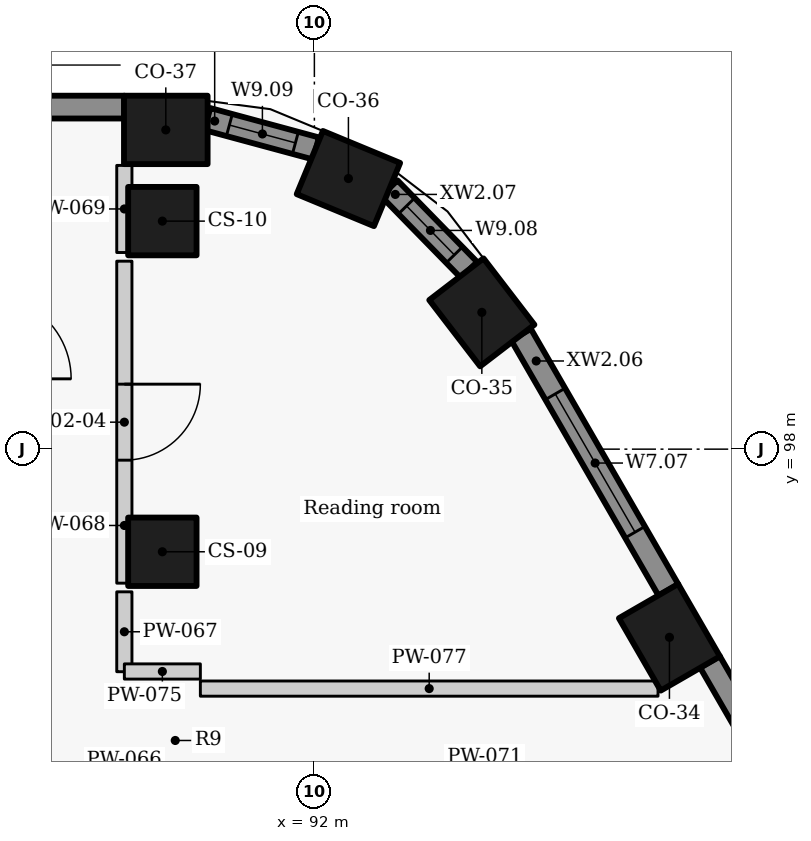
"""IFC4 building model, lengths in metres.
Left out: names, types, materials, properties, quantities, classifications, styles, units other than length and angle.
Written with IfcOpenShell. Run it as: python <this file> out.ifc"""

import sys

from ifc_helpers import new_model, si_unit, direction, frame, frame_2d, origin, origin_2d, place, context, subcontext, project, spatial, rectangle, extrude, element, fill, save


model = new_model("IFC4")
c1 = context("Model", 3, precision=1e-05, world=origin(), true_north=direction((0.0, 1.0)))
c2 = subcontext(c1, "Body", "Model", "MODEL_VIEW")
j1 = project(units=[si_unit("LENGTHUNIT", "METRE"), si_unit("PLANEANGLEUNIT", "RADIAN")], contexts=[c1])
p1 = place(None, origin())
s1 = spatial("IfcSite", under=j1, at=p1, CompositionType="ELEMENT")
p2 = place(p1, origin())
s2 = spatial("IfcBuilding", under=s1, at=p2, CompositionType="ELEMENT")
p3 = place(p2, frame((0.0, 0.0, 269.1)))
s3 = spatial("IfcBuildingStorey", under=s2, at=p3, CompositionType="ELEMENT", Elevation=269.1)
for number, where, z_axis, x_axis in (
    (1, (96.671, 95.525, 0.0), (0.0, 0.0, 1.0), (-0.5, 0.866, 0.0)),
    (2, (94.203, 99.8, 0.0), (0.0, 0.0, 1.0), (-0.609, 0.793, 0.0)),
    (3, (92.448, 101.56, 0.0), (0.0, 0.0, 1.0), (-0.924, 0.383, 0.0)),
    (4, (90.045, 102.2, 0.0), (0.0, 0.0, 1.0), (-1.0, 0.0, 0.0)),
):
    element("IfcColumn", number, at=place(p3, frame(where, z_axis=z_axis, x_axis=x_axis)), inside=s3, PredefinedType="COLUMN", context=c2, shape_type="SweptSolid", body=[
        extrude(rectangle(XDim=1.1, YDim=0.9, at=origin_2d()), origin(), (0.0, 0.0, 1.0), 3.3),
    ])
for number, where, z_axis, x_axis in (
    (5, (90.0, 96.65, 0.0), (0.0, 0.0, 1.0), (0.0, 1.0, 0.0)),
    (6, (90.0, 101.0, 0.0), (0.0, 0.0, 1.0), (0.0, 1.0, 0.0)),
):
    element("IfcColumn", number, at=place(p3, frame(where, z_axis=z_axis, x_axis=x_axis)), inside=s3, PredefinedType="COLUMN", context=c2, shape_type="SweptSolid", body=[
        extrude(rectangle(XDim=0.9, YDim=0.9, at=origin_2d()), origin(), (0.0, 0.0, 1.0), 3.3),
    ])
p4 = place(p3, frame((99.126, 91.873, 0.0), z_axis=(0.0, 0.0, 1.0), x_axis=(-0.499984490703, 0.866034357896, 0.0)))
e7 = element("IfcWall", 7, at=p4, inside=s3, PredefinedType="SOLIDWALL", context=c2, shape_type="SweptSolid", body=[
    extrude(rectangle(XDim=3.844, YDim=0.3, at=frame_2d((1.922, 0.0))), origin(), (0.0, 0.0, 1.0), 2.125),
])
p5 = place(p4, frame((0.43, 0.0, 0.9)))
e8 = element("IfcOpeningElement", 8, at=p5, cuts=e7, PredefinedType="OPENING", context=c2, shape_type="SweptSolid", body=[
    extrude(rectangle(XDim=1.2, YDim=1.1, at=frame_2d((0.6, 0.55))), frame((0.0, 0.16, 0.0), z_axis=(0.0, -1.0, 0.0), x_axis=(1.0, 0.0, 0.0)), (0.0, 0.0, 1.0), 0.32),
])
p6 = place(p3, frame((96.658, 96.147, 0.0), z_axis=(0.0, 0.0, 1.0), x_axis=(-0.500011218404, 0.866018926739, 0.0)))
e9 = element("IfcWall", 9, at=p6, inside=s3, PredefinedType="SOLIDWALL", context=c2, shape_type="SweptSolid", body=[
    extrude(rectangle(XDim=3.879, YDim=0.3, at=frame_2d((1.939, 0.0))), origin(), (0.0, 0.0, 1.0), 2.125),
])
p7 = place(p6, frame((0.878, 0.0, 0.9)))
e10 = element("IfcOpeningElement", 10, at=p7, cuts=e9, PredefinedType="OPENING", context=c2, shape_type="SweptSolid", body=[
    extrude(rectangle(XDim=2.1, YDim=1.1, at=frame_2d((1.05, 0.55))), frame((0.0, 0.16, 0.0), z_axis=(0.0, -1.0, 0.0), x_axis=(1.0, 0.0, 0.0)), (0.0, 0.0, 1.0), 0.32),
])
p8 = place(p3, frame((94.034, 100.358, 0.0), z_axis=(0.0, 0.0, 1.0), x_axis=(-0.698675602211, 0.71543860874, 0.0)))
e11 = element("IfcWall", 11, at=p8, inside=s3, PredefinedType="SOLIDWALL", context=c2, shape_type="SweptSolid", body=[
    extrude(rectangle(XDim=1.5, YDim=0.3, at=frame_2d((0.75, 0.0))), origin(), (0.0, 0.0, 1.0), 2.125),
])
p9 = place(p8, frame((0.276, 0.0, 0.9)))
e12 = element("IfcOpeningElement", 12, at=p9, cuts=e11, PredefinedType="OPENING", context=c2, shape_type="SweptSolid", body=[
    extrude(rectangle(XDim=0.9, YDim=1.1, at=frame_2d((0.45, 0.55))), frame((0.0, 0.16, 0.0), z_axis=(0.0, -1.0, 0.0), x_axis=(1.0, 0.0, 0.0)), (0.0, 0.0, 1.0), 0.32),
])
p10 = place(p3, frame((92.021, 101.956, 0.0), z_axis=(0.0, 0.0, 1.0), x_axis=(-0.965392564919, 0.260801065181, 0.0)))
e13 = element("IfcWall", 13, at=p10, inside=s3, PredefinedType="SOLIDWALL", context=c2, shape_type="SweptSolid", body=[
    extrude(rectangle(XDim=1.481, YDim=0.3, at=frame_2d((0.74, 0.0))), origin(), (0.0, 0.0, 1.0), 2.125),
])
p11 = place(p10, frame((0.28, 0.0, 0.9)))
e14 = element("IfcOpeningElement", 14, at=p11, cuts=e13, PredefinedType="OPENING", context=c2, shape_type="SweptSolid", body=[
    extrude(rectangle(XDim=0.9, YDim=1.1, at=frame_2d((0.45, 0.55))), frame((0.0, 0.16, 0.0), z_axis=(0.0, -1.0, 0.0), x_axis=(1.0, 0.0, 0.0)), (0.0, 0.0, 1.0), 0.32),
])
p12 = place(p3, frame((89.499, 102.5, 0.0), z_axis=(0.0, 0.0, 1.0), x_axis=(-1.0, 0.0, 0.0)))
e15 = element("IfcWall", 15, at=p12, inside=s3, PredefinedType="SOLIDWALL", context=c2, shape_type="SweptSolid", body=[
    extrude(rectangle(XDim=19.033, YDim=0.3, at=frame_2d((9.517, 0.0))), origin(), (0.0, 0.0, 1.0), 2.125),
])
p13 = place(p3, frame((89.5, 95.072, 0.0), z_axis=(0.0, 0.0, 1.0), x_axis=(0.0, 1.0, 0.0)))
e16 = element("IfcWall", 16, at=p13, inside=s3, PredefinedType="PARTITIONING", context=c2, shape_type="SweptSolid", body=[
    extrude(rectangle(XDim=1.051, YDim=0.2, at=frame_2d((0.525, 0.0))), origin(), (0.0, 0.0, 1.0), 3.025),
])
p14 = place(p3, frame((89.5, 100.473, 0.0), z_axis=(0.0, 0.0, 1.0), x_axis=(0.0, -1.0, 0.0)))
e17 = element("IfcWall", 17, at=p14, inside=s3, PredefinedType="PARTITIONING", context=c2, shape_type="SweptSolid", body=[
    extrude(rectangle(XDim=4.236, YDim=0.2, at=frame_2d((2.118, 0.0))), origin(), (0.0, 0.0, 1.0), 3.025),
])
p15 = place(p14, frame((1.618, 0.0, 0.0)))
e18 = element("IfcOpeningElement", 18, at=p15, cuts=e17, PredefinedType="OPENING", context=c2, shape_type="SweptSolid", body=[
    extrude(rectangle(XDim=1.0, YDim=2.1, at=frame_2d((0.5, 1.05))), frame((0.0, 0.11, 0.0), z_axis=(0.0, -1.0, 0.0), x_axis=(1.0, 0.0, 0.0)), (0.0, 0.0, 1.0), 0.22),
])
p16 = place(p3, frame((89.5, 100.587, 0.0), z_axis=(0.0, 0.0, 1.0), x_axis=(0.0, 1.0, 0.0)))
e19 = element("IfcWall", 19, at=p16, inside=s3, PredefinedType="PARTITIONING", context=c2, shape_type="SweptSolid", body=[
    extrude(rectangle(XDim=1.146, YDim=0.2, at=frame_2d((0.573, 0.0))), origin(), (0.0, 0.0, 1.0), 3.025),
])
p17 = place(p3, frame((89.5, 95.075, 0.0), z_axis=(0.0, 0.0, 1.0), x_axis=(1.0, 0.0, 0.0)))
e20 = element("IfcWall", 20, at=p17, inside=s3, PredefinedType="PARTITIONING", context=c2, shape_type="SweptSolid", body=[
    extrude(rectangle(XDim=1.0, YDim=0.2, at=frame_2d((0.5, 0.0))), origin(), (0.0, 0.0, 1.0), 2.505),
])
p18 = place(p3, frame((90.5, 94.85, 0.0), z_axis=(0.0, 0.0, 1.0), x_axis=(1.0, 0.0, 0.0)))
e21 = element("IfcWall", 21, at=p18, inside=s3, PredefinedType="PARTITIONING", context=c2, shape_type="SweptSolid", body=[
    extrude(rectangle(XDim=6.021, YDim=0.2, at=frame_2d((3.01, 0.0))), origin(), (0.0, 0.0, 1.0), 3.025),
])
p19 = place(p7, origin())
e22 = element("IfcWindow", 22, at=p19, inside=s3, PartitioningType="SINGLE_PANEL", PredefinedType="WINDOW", context=c2, shape_type="SweptSolid", body=[
    extrude(rectangle(XDim=2.1, YDim=1.1, at=frame_2d((1.05, 0.55))), frame((0.0, 0.03, 0.0), z_axis=(0.0, -1.0, 0.0), x_axis=(1.0, 0.0, 0.0)), (0.0, 0.0, 1.0), 0.06),
])
fill(e10, e22)
p20 = place(p9, origin())
e23 = element("IfcWindow", 23, at=p20, inside=s3, PartitioningType="SINGLE_PANEL", PredefinedType="WINDOW", context=c2, shape_type="SweptSolid", body=[
    extrude(rectangle(XDim=0.9, YDim=1.1, at=frame_2d((0.45, 0.55))), frame((0.0, 0.03, 0.0), z_axis=(0.0, -1.0, 0.0), x_axis=(1.0, 0.0, 0.0)), (0.0, 0.0, 1.0), 0.06),
])
fill(e12, e23)
p21 = place(p11, origin())
e24 = element("IfcWindow", 24, at=p21, inside=s3, PartitioningType="SINGLE_PANEL", PredefinedType="WINDOW", context=c2, shape_type="SweptSolid", body=[
    extrude(rectangle(XDim=0.9, YDim=1.1, at=frame_2d((0.45, 0.55))), frame((0.0, 0.03, 0.0), z_axis=(0.0, -1.0, 0.0), x_axis=(1.0, 0.0, 0.0)), (0.0, 0.0, 1.0), 0.06),
])
fill(e14, e24)
p22 = place(p15, origin())
e25 = element("IfcDoor", 25, at=p22, inside=s3, OperationType="SINGLE_SWING_LEFT", PredefinedType="DOOR", context=c2, shape_type="SweptSolid", body=[
    extrude(rectangle(XDim=1.0, YDim=2.1, at=frame_2d((0.5, 1.05))), frame((0.0, 0.025, 0.0), z_axis=(0.0, -1.0, 0.0), x_axis=(1.0, 0.0, 0.0)), (0.0, 0.0, 1.0), 0.05),
])
fill(e18, e25)
save(model, sys.argv[1])
